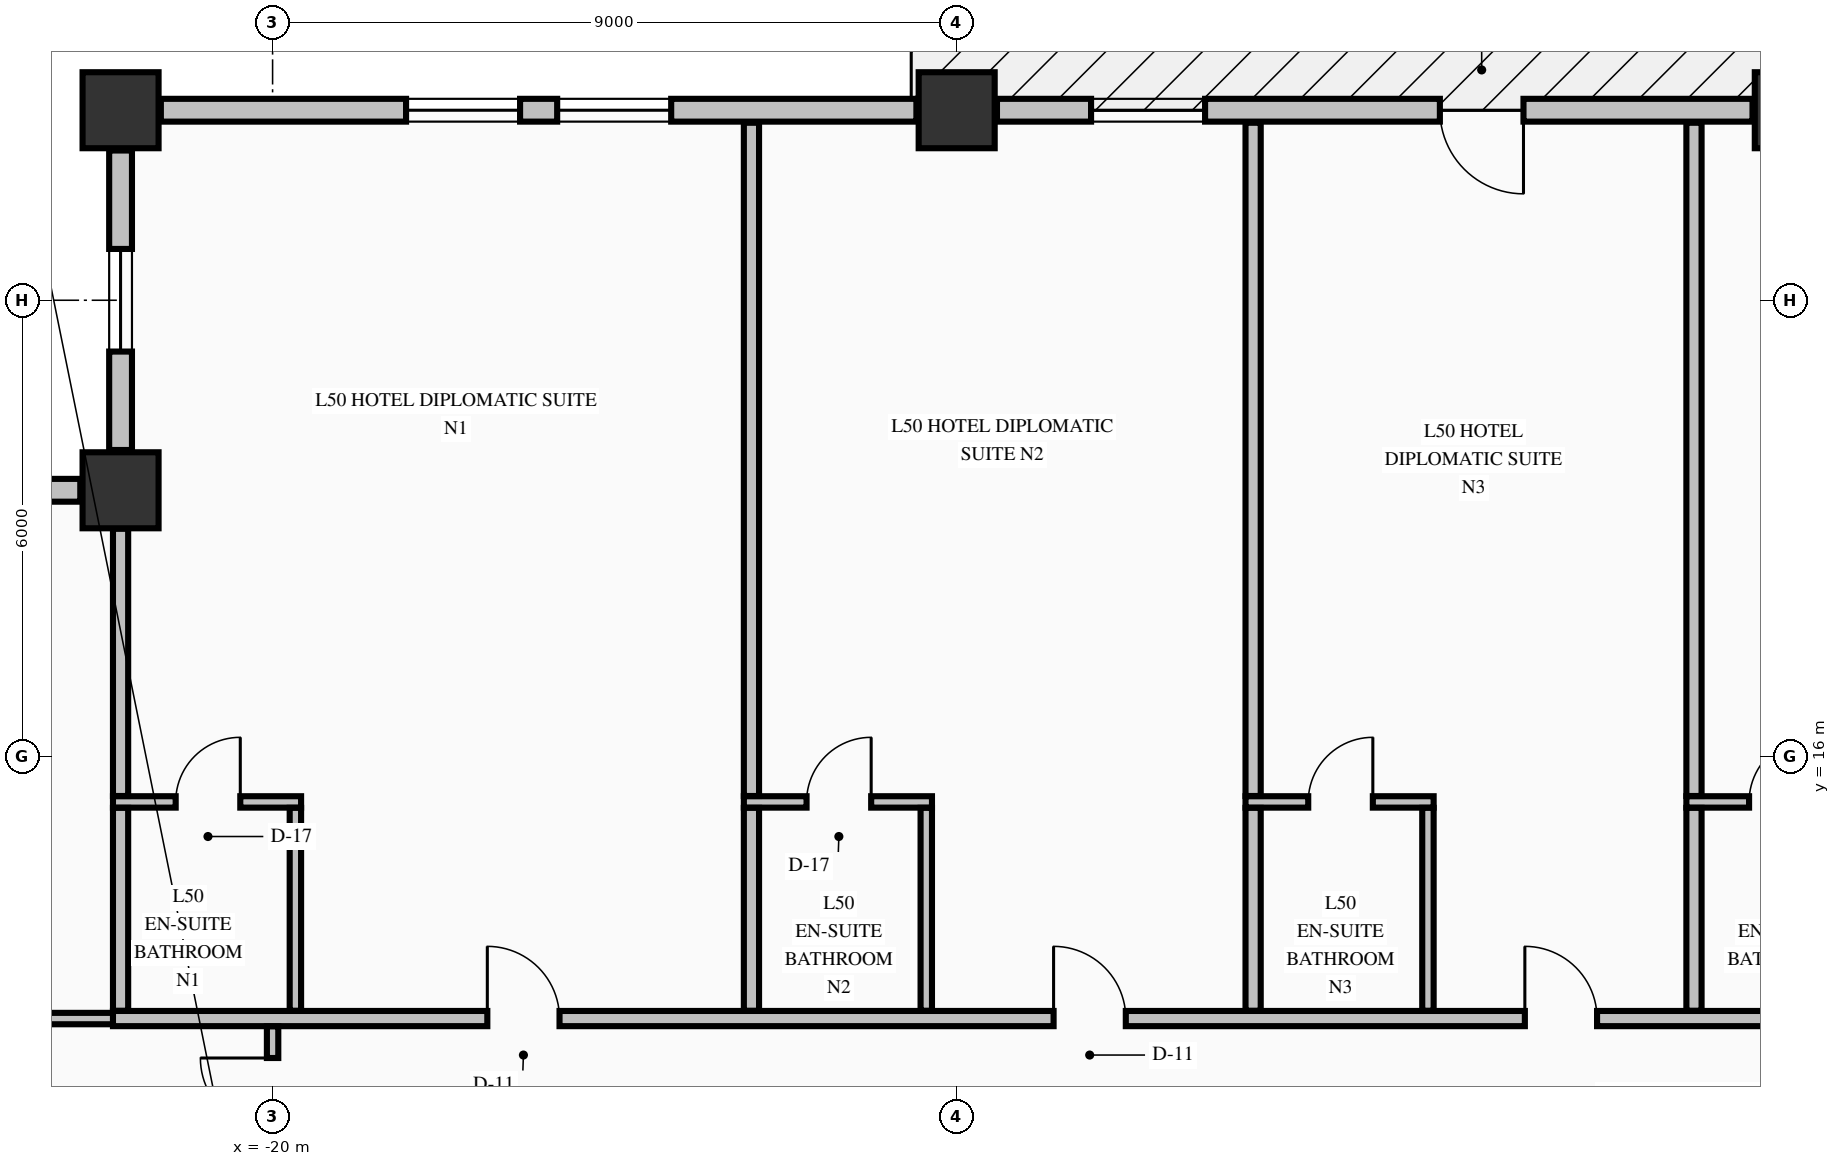
"""IFC4 building model, lengths in metres.
Left out: names, types, materials, properties, quantities, classifications, styles, units other than length and angle.
Written with IfcOpenShell. Run it as: python <this file> out.ifc"""

import sys

from ifc_helpers import new_model, si_unit, direction, frame, frame_2d, origin, origin_2d, place, context, subcontext, project, spatial, rectangle, extrude, element, fill, save


model = new_model("IFC4")
c1 = context("Model", 3, precision=1e-05, world=origin(), true_north=direction((0.0, 1.0)))
c2 = subcontext(c1, "Body", "Model", "MODEL_VIEW")
j1 = project(units=[si_unit("LENGTHUNIT", "METRE"), si_unit("PLANEANGLEUNIT", "RADIAN")], contexts=[c1])
p1 = place(None, origin())
s1 = spatial("IfcSite", under=j1, at=p1, CompositionType="ELEMENT")
p2 = place(p1, origin())
s2 = spatial("IfcBuilding", under=s1, at=p2, CompositionType="ELEMENT")
p3 = place(p2, frame((0.0, 0.0, 194.86)))
s3 = spatial("IfcBuildingStorey", under=s2, at=p3, CompositionType="ELEMENT", Elevation=194.86)
for number, where, z_axis, x_axis in (
    (1, (-22.0, 24.5, -0.275), (0.0, 0.0, 1.0), (1.0, 0.0, 0.0)),
    (2, (-11.0, 24.5, -0.275), (0.0, 0.0, 1.0), (1.0, 0.0, 0.0)),
    (3, (0.0, 24.5, -0.275), (0.0, 0.0, 1.0), (1.0, 0.0, 0.0)),
    (4, (-22.0, 19.5, -0.275), (0.0, 0.0, 1.0), (1.0, 0.0, 0.0)),
):
    element("IfcColumn", number, at=place(p3, frame(where, z_axis=z_axis, x_axis=x_axis)), inside=s3, PredefinedType="COLUMN", context=c2, shape_type="SweptSolid", body=[
        extrude(rectangle(XDim=1.0, YDim=1.0, at=origin_2d()), origin(), (0.0, 0.0, 1.0), 3.425),
    ])
p4 = place(p3, frame((-22.0, 23.97, 0.0), z_axis=(0.0, 0.0, 1.0), x_axis=(0.0, -1.0, 0.0)))
e5 = element("IfcWall", 5, at=p4, inside=s3, PredefinedType="STANDARD", context=c2, shape_type="SweptSolid", body=[
    extrude(rectangle(XDim=3.94, YDim=0.3, at=frame_2d((1.97, 0.0))), origin(), (0.0, 0.0, 1.0), 2.542),
])
p5 = place(p4, frame((1.295, 0.0, 0.68)))
e6 = element("IfcOpeningElement", 6, at=p5, cuts=e5, PredefinedType="OPENING", context=c2, shape_type="SweptSolid", body=[
    extrude(rectangle(XDim=1.35, YDim=1.42, at=frame_2d((0.675, 0.71))), frame((0.0, 0.16, 0.0), z_axis=(0.0, -1.0, 0.0), x_axis=(1.0, 0.0, 0.0)), (0.0, 0.0, 1.0), 0.32),
])
p6 = place(p3, frame((-22.53, 19.5, 0.0), z_axis=(0.0, 0.0, 1.0), x_axis=(-1.0, 0.0, 0.0)))
e7 = element("IfcWall", 7, at=p6, inside=s3, PredefinedType="STANDARD", context=c2, shape_type="SweptSolid", body=[
    extrude(rectangle(XDim=3.94, YDim=0.3, at=frame_2d((1.97, 0.0))), origin(), (0.0, 0.0, 1.0), 2.542),
])
p7 = place(p6, frame((1.295, 0.0, 0.68)))
e8 = element("IfcOpeningElement", 8, at=p7, cuts=e7, PredefinedType="OPENING", context=c2, shape_type="SweptSolid", body=[
    extrude(rectangle(XDim=1.35, YDim=1.42, at=frame_2d((0.675, 0.71))), frame((0.0, 0.16, 0.0), z_axis=(0.0, -1.0, 0.0), x_axis=(1.0, 0.0, 0.0)), (0.0, 0.0, 1.0), 0.32),
])
p8 = place(p3, frame((-11.53, 24.5, 0.0), z_axis=(0.0, 0.0, 1.0), x_axis=(-1.0, 0.0, 0.0)))
e9 = element("IfcWall", 9, at=p8, inside=s3, PredefinedType="STANDARD", context=c2, shape_type="SweptSolid", body=[
    extrude(rectangle(XDim=9.94, YDim=0.3, at=frame_2d((4.97, 0.0))), origin(), (0.0, 0.0, 1.0), 2.542),
])
p9 = place(p8, frame((3.226, 0.0, 0.72)))
e10 = element("IfcOpeningElement", 10, at=p9, cuts=e9, PredefinedType="OPENING", context=c2, shape_type="SweptSolid", body=[
    extrude(rectangle(XDim=1.5, YDim=1.6, at=frame_2d((0.75, 0.8))), frame((0.0, 0.16, 0.0), z_axis=(0.0, -1.0, 0.0), x_axis=(1.0, 0.0, 0.0)), (0.0, 0.0, 1.0), 0.32),
])
p10 = place(p8, frame((5.214, 0.0, 0.72)))
e11 = element("IfcOpeningElement", 11, at=p10, cuts=e9, PredefinedType="OPENING", context=c2, shape_type="SweptSolid", body=[
    extrude(rectangle(XDim=1.5, YDim=1.6, at=frame_2d((0.75, 0.8))), frame((0.0, 0.16, 0.0), z_axis=(0.0, -1.0, 0.0), x_axis=(1.0, 0.0, 0.0)), (0.0, 0.0, 1.0), 0.32),
])
p11 = place(p3, frame((-0.53, 24.5, 0.0), z_axis=(0.0, 0.0, 1.0), x_axis=(-1.0, 0.0, 0.0)))
e12 = element("IfcWall", 12, at=p11, inside=s3, PredefinedType="STANDARD", context=c2, shape_type="SweptSolid", body=[
    extrude(rectangle(XDim=9.94, YDim=0.3, at=frame_2d((4.97, 0.0))), origin(), (0.0, 0.0, 1.0), 2.542),
])
p12 = place(p11, frame((3.013, 0.0, 0.0)))
e13 = element("IfcOpeningElement", 13, at=p12, cuts=e12, PredefinedType="OPENING", context=c2, shape_type="SweptSolid", body=[
    extrude(rectangle(XDim=1.1, YDim=2.15, at=frame_2d((0.55, 1.075))), frame((0.0, 0.16, 0.0), z_axis=(0.0, -1.0, 0.0), x_axis=(1.0, 0.0, 0.0)), (0.0, 0.0, 1.0), 0.32),
])
p13 = place(p11, frame((7.202, 0.0, 0.72)))
e14 = element("IfcOpeningElement", 14, at=p13, cuts=e12, PredefinedType="OPENING", context=c2, shape_type="SweptSolid", body=[
    extrude(rectangle(XDim=1.5, YDim=1.6, at=frame_2d((0.75, 0.8))), frame((0.0, 0.16, 0.0), z_axis=(0.0, -1.0, 0.0), x_axis=(1.0, 0.0, 0.0)), (0.0, 0.0, 1.0), 0.32),
])
p14 = place(p3, frame((-26.835, 12.55, 0.0), z_axis=(0.0, 0.0, 1.0), x_axis=(1.0, 0.0, 0.0)))
e15 = element("IfcWall", 15, at=p14, inside=s3, PredefinedType="PARTITIONING", context=c2, shape_type="SweptSolid", body=[
    extrude(rectangle(XDim=4.935, YDim=0.15, at=frame_2d((2.468, 0.0))), origin(), (0.0, 0.0, 1.0), 3.15),
])
p15 = place(p3, frame((-22.1, 12.55, 0.0), z_axis=(0.0, 0.0, 1.0), x_axis=(1.0, 0.0, 0.0)))
e16 = element("IfcWall", 16, at=p15, inside=s3, PredefinedType="PARTITIONING", context=c2, shape_type="SweptSolid", body=[
    extrude(rectangle(XDim=39.2, YDim=0.2, at=frame_2d((19.6, 0.0))), origin(), (0.0, 0.0, 1.0), 3.15),
])
p16 = place(p15, frame((4.925, 0.0, 0.0)))
e17 = element("IfcOpeningElement", 17, at=p16, cuts=e16, PredefinedType="OPENING", context=c2, shape_type="SweptSolid", body=[
    extrude(rectangle(XDim=0.95, YDim=2.15, at=frame_2d((0.475, 1.075))), frame((0.0, 0.11, 0.0), z_axis=(0.0, -1.0, 0.0), x_axis=(1.0, 0.0, 0.0)), (0.0, 0.0, 1.0), 0.22),
])
p17 = place(p15, frame((12.375, 0.0, 0.0)))
e18 = element("IfcOpeningElement", 18, at=p17, cuts=e16, PredefinedType="OPENING", context=c2, shape_type="SweptSolid", body=[
    extrude(rectangle(XDim=0.95, YDim=2.15, at=frame_2d((0.475, 1.075))), frame((0.0, 0.11, 0.0), z_axis=(0.0, -1.0, 0.0), x_axis=(1.0, 0.0, 0.0)), (0.0, 0.0, 1.0), 0.22),
])
p18 = place(p15, frame((18.575, 0.0, 0.0)))
e19 = element("IfcOpeningElement", 19, at=p18, cuts=e16, PredefinedType="OPENING", context=c2, shape_type="SweptSolid", body=[
    extrude(rectangle(XDim=0.95, YDim=2.15, at=frame_2d((0.475, 1.075))), frame((0.0, 0.11, 0.0), z_axis=(0.0, -1.0, 0.0), x_axis=(1.0, 0.0, 0.0)), (0.0, 0.0, 1.0), 0.22),
])
p19 = place(p15, frame((24.475, 0.0, 0.0)))
e20 = element("IfcOpeningElement", 20, at=p19, cuts=e16, PredefinedType="OPENING", context=c2, shape_type="SweptSolid", body=[
    extrude(rectangle(XDim=0.95, YDim=2.15, at=frame_2d((0.475, 1.075))), frame((0.0, 0.11, 0.0), z_axis=(0.0, -1.0, 0.0), x_axis=(1.0, 0.0, 0.0)), (0.0, 0.0, 1.0), 0.22),
])
p20 = place(p15, frame((30.375, 0.0, 0.0)))
e21 = element("IfcOpeningElement", 21, at=p20, cuts=e16, PredefinedType="OPENING", context=c2, shape_type="SweptSolid", body=[
    extrude(rectangle(XDim=0.95, YDim=2.15, at=frame_2d((0.475, 1.075))), frame((0.0, 0.11, 0.0), z_axis=(0.0, -1.0, 0.0), x_axis=(1.0, 0.0, 0.0)), (0.0, 0.0, 1.0), 0.22),
])
p21 = place(p15, frame((36.525, 0.0, 0.0)))
e22 = element("IfcOpeningElement", 22, at=p21, cuts=e16, PredefinedType="OPENING", context=c2, shape_type="SweptSolid", body=[
    extrude(rectangle(XDim=0.95, YDim=2.15, at=frame_2d((0.475, 1.075))), frame((0.0, 0.11, 0.0), z_axis=(0.0, -1.0, 0.0), x_axis=(1.0, 0.0, 0.0)), (0.0, 0.0, 1.0), 0.22),
])
p22 = place(p3, frame((-22.1, 15.4, 0.0), z_axis=(0.0, 0.0, 1.0), x_axis=(1.0, 0.0, 0.0)))
e23 = element("IfcWall", 23, at=p22, inside=s3, PredefinedType="PARTITIONING", context=c2, shape_type="SweptSolid", body=[
    extrude(rectangle(XDim=2.475, YDim=0.15, at=frame_2d((1.238, 0.0))), origin(), (0.0, 0.0, 1.0), 3.15),
])
p23 = place(p22, frame((0.825, 0.0, 0.0)))
e24 = element("IfcOpeningElement", 24, at=p23, cuts=e23, PredefinedType="OPENING", context=c2, shape_type="SweptSolid", body=[
    extrude(rectangle(XDim=0.85, YDim=2.1, at=frame_2d((0.425, 1.05))), frame((0.0, 0.085, 0.0), z_axis=(0.0, -1.0, 0.0), x_axis=(1.0, 0.0, 0.0)), (0.0, 0.0, 1.0), 0.17),
])
p24 = place(p3, frame((-13.8, 15.4, 0.0), z_axis=(0.0, 0.0, 1.0), x_axis=(1.0, 0.0, 0.0)))
e25 = element("IfcWall", 25, at=p24, inside=s3, PredefinedType="PARTITIONING", context=c2, shape_type="SweptSolid", body=[
    extrude(rectangle(XDim=2.475, YDim=0.15, at=frame_2d((1.238, 0.0))), origin(), (0.0, 0.0, 1.0), 3.15),
])
p25 = place(p24, frame((0.825, 0.0, 0.0)))
e26 = element("IfcOpeningElement", 26, at=p25, cuts=e25, PredefinedType="OPENING", context=c2, shape_type="SweptSolid", body=[
    extrude(rectangle(XDim=0.85, YDim=2.1, at=frame_2d((0.425, 1.05))), frame((0.0, 0.085, 0.0), z_axis=(0.0, -1.0, 0.0), x_axis=(1.0, 0.0, 0.0)), (0.0, 0.0, 1.0), 0.17),
])
p26 = place(p3, frame((-7.2, 15.4, 0.0), z_axis=(0.0, 0.0, 1.0), x_axis=(1.0, 0.0, 0.0)))
e27 = element("IfcWall", 27, at=p26, inside=s3, PredefinedType="PARTITIONING", context=c2, shape_type="SweptSolid", body=[
    extrude(rectangle(XDim=2.475, YDim=0.15, at=frame_2d((1.237, 0.0))), origin(), (0.0, 0.0, 1.0), 3.15),
])
p27 = place(p26, frame((0.825, 0.0, 0.0)))
e28 = element("IfcOpeningElement", 28, at=p27, cuts=e27, PredefinedType="OPENING", context=c2, shape_type="SweptSolid", body=[
    extrude(rectangle(XDim=0.85, YDim=2.1, at=frame_2d((0.425, 1.05))), frame((0.0, 0.085, 0.0), z_axis=(0.0, -1.0, 0.0), x_axis=(1.0, 0.0, 0.0)), (0.0, 0.0, 1.0), 0.17),
])
p28 = place(p3, frame((-1.4, 15.4, 0.0), z_axis=(0.0, 0.0, 1.0), x_axis=(1.0, 0.0, 0.0)))
e29 = element("IfcWall", 29, at=p28, inside=s3, PredefinedType="PARTITIONING", context=c2, shape_type="SweptSolid", body=[
    extrude(rectangle(XDim=2.475, YDim=0.15, at=frame_2d((1.237, 0.0))), origin(), (0.0, 0.0, 1.0), 3.15),
])
p29 = place(p28, frame((0.825, 0.0, 0.0)))
e30 = element("IfcOpeningElement", 30, at=p29, cuts=e29, PredefinedType="OPENING", context=c2, shape_type="SweptSolid", body=[
    extrude(rectangle(XDim=0.85, YDim=2.1, at=frame_2d((0.425, 1.05))), frame((0.0, 0.085, 0.0), z_axis=(0.0, -1.0, 0.0), x_axis=(1.0, 0.0, 0.0)), (0.0, 0.0, 1.0), 0.17),
])
p30 = place(p3, frame((-22.0, 12.653, 0.0), z_axis=(0.0, 0.0, 1.0), x_axis=(0.0, 1.0, 0.0)))
e31 = element("IfcWall", 31, at=p30, inside=s3, PredefinedType="PARTITIONING", context=c2, shape_type="SweptSolid", body=[
    extrude(rectangle(XDim=2.669, YDim=0.2, at=frame_2d((1.334, 0.0))), origin(), (0.0, 0.0, 1.0), 3.15),
])
p31 = place(p3, frame((-22.0, 15.478, 0.0), z_axis=(0.0, 0.0, 1.0), x_axis=(0.0, 1.0, 0.0)))
e32 = element("IfcWall", 32, at=p31, inside=s3, PredefinedType="PARTITIONING", context=c2, shape_type="SweptSolid", body=[
    extrude(rectangle(XDim=3.516, YDim=0.2, at=frame_2d((1.758, 0.0))), origin(), (0.0, 0.0, 1.0), 3.15),
])
p32 = place(p3, frame((-20.0, 10.931, 0.0), z_axis=(0.0, 0.0, 1.0), x_axis=(0.0, 1.0, 0.0)))
e33 = element("IfcWall", 33, at=p32, inside=s3, PredefinedType="PARTITIONING", context=c2, shape_type="SweptSolid", body=[
    extrude(rectangle(XDim=1.516, YDim=0.15, at=frame_2d((0.758, 0.0))), origin(), (0.0, 0.0, 1.0), 2.342),
])
p33 = place(p32, frame((0.15, 0.0, 0.0)))
e34 = element("IfcOpeningElement", 34, at=p33, cuts=e33, PredefinedType="OPENING", context=c2, shape_type="SweptSolid", body=[
    extrude(rectangle(XDim=0.95, YDim=2.15, at=frame_2d((0.475, 1.075))), frame((0.0, 0.085, 0.0), z_axis=(0.0, -1.0, 0.0), x_axis=(1.0, 0.0, 0.0)), (0.0, 0.0, 1.0), 0.17),
])
p34 = place(p3, frame((-19.7, 12.653, 0.0), z_axis=(0.0, 0.0, 1.0), x_axis=(0.0, 1.0, 0.0)))
e35 = element("IfcWall", 35, at=p34, inside=s3, PredefinedType="PARTITIONING", context=c2, shape_type="SweptSolid", body=[
    extrude(rectangle(XDim=2.669, YDim=0.15, at=frame_2d((1.334, 0.0))), origin(), (0.0, 0.0, 1.0), 2.342),
])
p35 = place(p3, frame((-13.7, 12.653, 0.0), z_axis=(0.0, 0.0, 1.0), x_axis=(0.0, 1.0, 0.0)))
e36 = element("IfcWall", 36, at=p35, inside=s3, PredefinedType="PARTITIONING", context=c2, shape_type="SweptSolid", body=[
    extrude(rectangle(XDim=2.669, YDim=0.2, at=frame_2d((1.334, 0.0))), origin(), (0.0, 0.0, 1.0), 3.15),
])
p36 = place(p3, frame((-13.7, 15.478, 0.0), z_axis=(0.0, 0.0, 1.0), x_axis=(0.0, 1.0, 0.0)))
e37 = element("IfcWall", 37, at=p36, inside=s3, PredefinedType="PARTITIONING", context=c2, shape_type="SweptSolid", body=[
    extrude(rectangle(XDim=8.857, YDim=0.2, at=frame_2d((4.428, 0.0))), origin(), (0.0, 0.0, 1.0), 3.15),
])
p37 = place(p3, frame((-11.4, 12.653, 0.0), z_axis=(0.0, 0.0, 1.0), x_axis=(0.0, 1.0, 0.0)))
e38 = element("IfcWall", 38, at=p37, inside=s3, PredefinedType="PARTITIONING", context=c2, shape_type="SweptSolid", body=[
    extrude(rectangle(XDim=2.669, YDim=0.15, at=frame_2d((1.334, 0.0))), origin(), (0.0, 0.0, 1.0), 2.342),
])
p38 = place(p3, frame((-7.1, 12.653, 0.0), z_axis=(0.0, 0.0, 1.0), x_axis=(0.0, 1.0, 0.0)))
e39 = element("IfcWall", 39, at=p38, inside=s3, PredefinedType="PARTITIONING", context=c2, shape_type="SweptSolid", body=[
    extrude(rectangle(XDim=2.669, YDim=0.2, at=frame_2d((1.334, 0.0))), origin(), (0.0, 0.0, 1.0), 3.15),
])
p39 = place(p3, frame((-7.1, 15.478, 0.0), z_axis=(0.0, 0.0, 1.0), x_axis=(0.0, 1.0, 0.0)))
e40 = element("IfcWall", 40, at=p39, inside=s3, PredefinedType="PARTITIONING", context=c2, shape_type="SweptSolid", body=[
    extrude(rectangle(XDim=8.857, YDim=0.2, at=frame_2d((4.428, 0.0))), origin(), (0.0, 0.0, 1.0), 3.15),
])
p40 = place(p3, frame((-4.8, 12.653, 0.0), z_axis=(0.0, 0.0, 1.0), x_axis=(0.0, 1.0, 0.0)))
e41 = element("IfcWall", 41, at=p40, inside=s3, PredefinedType="PARTITIONING", context=c2, shape_type="SweptSolid", body=[
    extrude(rectangle(XDim=2.669, YDim=0.15, at=frame_2d((1.334, 0.0))), origin(), (0.0, 0.0, 1.0), 3.15),
])
p41 = place(p3, frame((-1.3, 12.653, 0.0), z_axis=(0.0, 0.0, 1.0), x_axis=(0.0, 1.0, 0.0)))
e42 = element("IfcWall", 42, at=p41, inside=s3, PredefinedType="PARTITIONING", context=c2, shape_type="SweptSolid", body=[
    extrude(rectangle(XDim=2.669, YDim=0.2, at=frame_2d((1.334, 0.0))), origin(), (0.0, 0.0, 1.0), 3.15),
])
p42 = place(p3, frame((-1.3, 15.478, 0.0), z_axis=(0.0, 0.0, 1.0), x_axis=(0.0, 1.0, 0.0)))
e43 = element("IfcWall", 43, at=p42, inside=s3, PredefinedType="PARTITIONING", context=c2, shape_type="SweptSolid", body=[
    extrude(rectangle(XDim=8.857, YDim=0.2, at=frame_2d((4.428, 0.0))), origin(), (0.0, 0.0, 1.0), 3.15),
])
p43 = place(p5, origin())
e44 = element("IfcWindow", 44, at=p43, inside=s3, PartitioningType="SINGLE_PANEL", PredefinedType="WINDOW", context=c2, shape_type="SweptSolid", body=[
    extrude(rectangle(XDim=1.35, YDim=1.42, at=frame_2d((0.675, 0.71))), frame((0.0, 0.03, 0.0), z_axis=(0.0, -1.0, 0.0), x_axis=(1.0, 0.0, 0.0)), (0.0, 0.0, 1.0), 0.06),
])
fill(e6, e44)
p44 = place(p9, origin())
e45 = element("IfcWindow", 45, at=p44, inside=s3, PartitioningType="SINGLE_PANEL", PredefinedType="WINDOW", context=c2, shape_type="SweptSolid", body=[
    extrude(rectangle(XDim=1.5, YDim=1.6, at=frame_2d((0.75, 0.8))), frame((0.0, 0.03, 0.0), z_axis=(0.0, -1.0, 0.0), x_axis=(1.0, 0.0, 0.0)), (0.0, 0.0, 1.0), 0.06),
])
fill(e10, e45)
p45 = place(p10, origin())
e46 = element("IfcWindow", 46, at=p45, inside=s3, PartitioningType="SINGLE_PANEL", PredefinedType="WINDOW", context=c2, shape_type="SweptSolid", body=[
    extrude(rectangle(XDim=1.5, YDim=1.6, at=frame_2d((0.75, 0.8))), frame((0.0, 0.03, 0.0), z_axis=(0.0, -1.0, 0.0), x_axis=(1.0, 0.0, 0.0)), (0.0, 0.0, 1.0), 0.06),
])
fill(e11, e46)
p46 = place(p12, origin())
e47 = element("IfcDoor", 47, at=p46, inside=s3, OperationType="SINGLE_SWING_LEFT", PredefinedType="DOOR", context=c2, shape_type="SweptSolid", body=[
    extrude(rectangle(XDim=1.1, YDim=2.15, at=frame_2d((0.55, 1.075))), frame((0.0, 0.025, 0.0), z_axis=(0.0, -1.0, 0.0), x_axis=(1.0, 0.0, 0.0)), (0.0, 0.0, 1.0), 0.05),
])
fill(e13, e47)
p47 = place(p13, origin())
e48 = element("IfcWindow", 48, at=p47, inside=s3, PartitioningType="SINGLE_PANEL", PredefinedType="WINDOW", context=c2, shape_type="SweptSolid", body=[
    extrude(rectangle(XDim=1.5, YDim=1.6, at=frame_2d((0.75, 0.8))), frame((0.0, 0.03, 0.0), z_axis=(0.0, -1.0, 0.0), x_axis=(1.0, 0.0, 0.0)), (0.0, 0.0, 1.0), 0.06),
])
fill(e14, e48)
p48 = place(p16, origin())
e49 = element("IfcDoor", 49, at=p48, inside=s3, OperationType="SINGLE_SWING_LEFT", PredefinedType="DOOR", context=c2, shape_type="SweptSolid", body=[
    extrude(rectangle(XDim=0.95, YDim=2.15, at=frame_2d((0.475, 1.075))), frame((0.0, 0.025, 0.0), z_axis=(0.0, -1.0, 0.0), x_axis=(1.0, 0.0, 0.0)), (0.0, 0.0, 1.0), 0.05),
])
fill(e17, e49)
p49 = place(p23, origin())
e50 = element("IfcDoor", 50, at=p49, inside=s3, OperationType="SINGLE_SWING_RIGHT", PredefinedType="DOOR", context=c2, shape_type="SweptSolid", body=[
    extrude(rectangle(XDim=0.85, YDim=2.1, at=frame_2d((0.425, 1.05))), frame((0.0, 0.025, 0.0), z_axis=(0.0, -1.0, 0.0), x_axis=(1.0, 0.0, 0.0)), (0.0, 0.0, 1.0), 0.05),
])
fill(e24, e50)
p50 = place(p17, origin())
e51 = element("IfcDoor", 51, at=p50, inside=s3, OperationType="SINGLE_SWING_LEFT", PredefinedType="DOOR", context=c2, shape_type="SweptSolid", body=[
    extrude(rectangle(XDim=0.95, YDim=2.15, at=frame_2d((0.475, 1.075))), frame((0.0, 0.025, 0.0), z_axis=(0.0, -1.0, 0.0), x_axis=(1.0, 0.0, 0.0)), (0.0, 0.0, 1.0), 0.05),
])
fill(e18, e51)
p51 = place(p25, origin())
e52 = element("IfcDoor", 52, at=p51, inside=s3, OperationType="SINGLE_SWING_RIGHT", PredefinedType="DOOR", context=c2, shape_type="SweptSolid", body=[
    extrude(rectangle(XDim=0.85, YDim=2.1, at=frame_2d((0.425, 1.05))), frame((0.0, 0.025, 0.0), z_axis=(0.0, -1.0, 0.0), x_axis=(1.0, 0.0, 0.0)), (0.0, 0.0, 1.0), 0.05),
])
fill(e26, e52)
p52 = place(p18, origin())
e53 = element("IfcDoor", 53, at=p52, inside=s3, OperationType="SINGLE_SWING_LEFT", PredefinedType="DOOR", context=c2, shape_type="SweptSolid", body=[
    extrude(rectangle(XDim=0.95, YDim=2.15, at=frame_2d((0.475, 1.075))), frame((0.0, 0.025, 0.0), z_axis=(0.0, -1.0, 0.0), x_axis=(1.0, 0.0, 0.0)), (0.0, 0.0, 1.0), 0.05),
])
fill(e19, e53)
p53 = place(p27, origin())
e54 = element("IfcDoor", 54, at=p53, inside=s3, OperationType="SINGLE_SWING_RIGHT", PredefinedType="DOOR", context=c2, shape_type="SweptSolid", body=[
    extrude(rectangle(XDim=0.85, YDim=2.1, at=frame_2d((0.425, 1.05))), frame((0.0, 0.025, 0.0), z_axis=(0.0, -1.0, 0.0), x_axis=(1.0, 0.0, 0.0)), (0.0, 0.0, 1.0), 0.05),
])
fill(e28, e54)
p54 = place(p29, origin())
e55 = element("IfcDoor", 55, at=p54, inside=s3, OperationType="SINGLE_SWING_RIGHT", PredefinedType="DOOR", context=c2, shape_type="SweptSolid", body=[
    extrude(rectangle(XDim=0.85, YDim=2.1, at=frame_2d((0.425, 1.05))), frame((0.0, 0.025, 0.0), z_axis=(0.0, -1.0, 0.0), x_axis=(1.0, 0.0, 0.0)), (0.0, 0.0, 1.0), 0.05),
])
fill(e30, e55)
p55 = place(p33, origin())
e56 = element("IfcDoor", 56, at=p55, inside=s3, OperationType="SINGLE_SWING_RIGHT", PredefinedType="DOOR", context=c2, shape_type="SweptSolid", body=[
    extrude(rectangle(XDim=0.95, YDim=2.15, at=frame_2d((0.475, 1.075))), frame((0.0, 0.025, 0.0), z_axis=(0.0, -1.0, 0.0), x_axis=(1.0, 0.0, 0.0)), (0.0, 0.0, 1.0), 0.05),
])
fill(e34, e56)
save(model, sys.argv[1])
